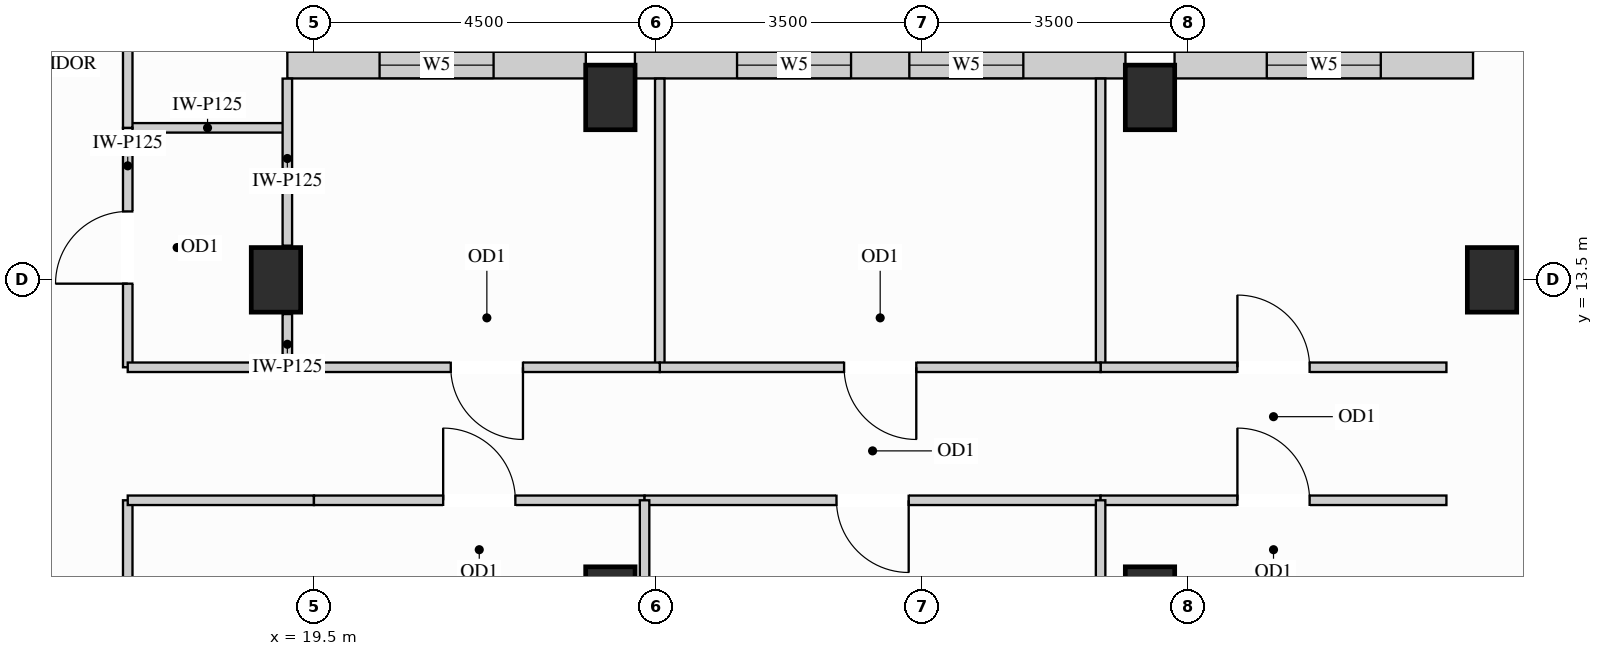
"""IFC4 building model, lengths in metres.
Left out: names, types, materials, properties, quantities, classifications, styles, units other than length and angle.
Written with IfcOpenShell. Run it as: python <this file> out.ifc"""

import sys

from ifc_helpers import new_model, si_unit, direction, frame, frame_2d, origin, origin_2d, place, context, subcontext, project, spatial, rectangle, extrude, source, transform, mapped, element, fill, save


model = new_model("IFC4")
c1 = context("Model", 3, precision=1e-05, world=origin(), true_north=direction((0.0, 1.0)))
c2 = subcontext(c1, "Body", "Model", "MODEL_VIEW")
j1 = project(units=[si_unit("LENGTHUNIT", "METRE"), si_unit("PLANEANGLEUNIT", "RADIAN")], contexts=[c1])
p1 = place(None, origin())
s1 = spatial("IfcSite", under=j1, at=p1, CompositionType="ELEMENT")
p2 = place(p1, origin())
s2 = spatial("IfcBuilding", under=s1, at=p2, CompositionType="ELEMENT")
p3 = place(p2, frame((0.0, 0.0, 230.4)))
s3 = spatial("IfcBuildingStorey", under=s2, at=p3, CompositionType="ELEMENT", Elevation=230.4)
m1 = source(origin(), c2, "Body", "SweptSolid", [
    extrude(rectangle(XDim=0.65, YDim=0.85, at=origin_2d()), origin(), (0.0, 0.0, 1.0), 3.4),
])
for number, where, z_axis, x_axis in (
    (1, (19.0, 13.5, 0.0), (0.0, 0.0, 1.0), (1.0, 0.0, 0.0)),
    (2, (35.0, 13.5, 0.0), (0.0, 0.0, 1.0), (1.0, 0.0, 0.0)),
    (3, (23.4, 15.9, 0.0), (0.0, 0.0, 1.0), (1.0, 0.0, 0.0)),
    (4, (23.4, 9.3, 0.0), (0.0, 0.0, 1.0), (1.0, 0.0, 0.0)),
    (5, (30.5, 15.9, 0.0), (0.0, 0.0, 1.0), (1.0, 0.0, 0.0)),
    (6, (30.5, 9.3, 0.0), (0.0, 0.0, 1.0), (1.0, 0.0, 0.0)),
):
    element("IfcColumn", number, at=place(p3, frame(where, z_axis=z_axis, x_axis=x_axis)), inside=s3, PredefinedType="COLUMN", context=c2, shape_type="MappedRepresentation", body=[
        mapped(m1, transform((0.0, 0.0, 0.0), x_axis=(1.0, 0.0, 0.0), y_axis=(0.0, 1.0, 0.0), z_axis=(0.0, 0.0, 1.0))),
    ])
m2 = source(origin(), c2, "Body", "SweptSolid", [
    extrude(rectangle(XDim=1.079, YDim=0.35, at=frame_2d((0.54, 0.0))), origin(), (0.0, 0.0, 1.0), 2.619),
])
p4 = place(p3, frame((19.325, 16.498, 0.0), z_axis=(0.0, 0.0, 1.0), x_axis=(0.0, 1.0, 0.0)))
e7 = element("IfcWall", 7, at=p4, inside=s3, PredefinedType="SOLIDWALL", context=c2, shape_type="MappedRepresentation", body=[
    mapped(m2, transform((0.0, 0.0, 0.0), x_axis=(1.0, 0.0, 0.0), y_axis=(0.0, 1.0, 0.0), z_axis=(0.0, 0.0, 1.0))),
])
m3 = source(origin(), c2, "Body", "SweptSolid", [
    extrude(rectangle(XDim=0.479, YDim=0.35, at=frame_2d((0.24, 0.0))), origin(), (0.0, 0.0, 1.0), 3.385),
])
p5 = place(p3, frame((34.575, 16.977, 0.0), z_axis=(0.0, 0.0, 1.0), x_axis=(0.0, -1.0, 0.0)))
e8 = element("IfcWall", 8, at=p5, inside=s3, PredefinedType="SOLIDWALL", context=c2, shape_type="MappedRepresentation", body=[
    mapped(m3, transform((0.0, 0.0, 0.0), x_axis=(1.0, 0.0, 0.0), y_axis=(0.0, 1.0, 0.0), z_axis=(0.0, 0.0, 1.0))),
])
p6 = place(p3, frame((34.75, 16.325, 0.0), z_axis=(0.0, 0.0, 1.0), x_axis=(-1.0, 0.0, 0.0)))
e9 = element("IfcWall", 9, at=p6, inside=s3, PredefinedType="SOLIDWALL", context=c2, shape_type="SweptSolid", body=[
    extrude(rectangle(XDim=3.927, YDim=0.35, at=frame_2d((1.963, 0.0))), origin(), (0.0, 0.0, 1.0), 3.385),
])
p7 = place(p6, frame((1.213, 0.0, 0.78)))
e10 = element("IfcOpeningElement", 10, at=p7, cuts=e9, PredefinedType="OPENING", context=c2, shape_type="SweptSolid", body=[
    extrude(rectangle(XDim=1.5, YDim=2.0, at=frame_2d((0.75, 1.0))), frame((0.0, 0.185, 0.0), z_axis=(0.0, -1.0, 0.0), x_axis=(1.0, 0.0, 0.0)), (0.0, 0.0, 1.0), 0.37),
])
p8 = place(p3, frame((30.177, 16.325, 0.0), z_axis=(0.0, 0.0, 1.0), x_axis=(-1.0, 0.0, 0.0)))
e11 = element("IfcWall", 11, at=p8, inside=s3, PredefinedType="SOLIDWALL", context=c2, shape_type="SweptSolid", body=[
    extrude(rectangle(XDim=6.454, YDim=0.35, at=frame_2d((3.227, 0.0))), origin(), (0.0, 0.0, 1.0), 3.385),
])
p9 = place(p8, frame((1.344, 0.0, 0.78)))
e12 = element("IfcOpeningElement", 12, at=p9, cuts=e11, PredefinedType="OPENING", context=c2, shape_type="SweptSolid", body=[
    extrude(rectangle(XDim=1.5, YDim=2.0, at=frame_2d((0.75, 1.0))), frame((0.0, 0.185, 0.0), z_axis=(0.0, -1.0, 0.0), x_axis=(1.0, 0.0, 0.0)), (0.0, 0.0, 1.0), 0.37),
])
p10 = place(p8, frame((3.61, 0.0, 0.78)))
e13 = element("IfcOpeningElement", 13, at=p10, cuts=e11, PredefinedType="OPENING", context=c2, shape_type="SweptSolid", body=[
    extrude(rectangle(XDim=1.5, YDim=2.0, at=frame_2d((0.75, 1.0))), frame((0.0, 0.185, 0.0), z_axis=(0.0, -1.0, 0.0), x_axis=(1.0, 0.0, 0.0)), (0.0, 0.0, 1.0), 0.37),
])
p11 = place(p3, frame((23.077, 16.325, 0.0), z_axis=(0.0, 0.0, 1.0), x_axis=(-1.0, 0.0, 0.0)))
e14 = element("IfcWall", 14, at=p11, inside=s3, PredefinedType="SOLIDWALL", context=c2, shape_type="SweptSolid", body=[
    extrude(rectangle(XDim=3.927, YDim=0.35, at=frame_2d((1.963, 0.0))), origin(), (0.0, 0.0, 1.0), 3.385),
])
p12 = place(p11, frame((1.213, 0.0, 0.78)))
e15 = element("IfcOpeningElement", 15, at=p12, cuts=e14, PredefinedType="OPENING", context=c2, shape_type="SweptSolid", body=[
    extrude(rectangle(XDim=1.5, YDim=2.0, at=frame_2d((0.75, 1.0))), frame((0.0, 0.185, 0.0), z_axis=(0.0, -1.0, 0.0), x_axis=(1.0, 0.0, 0.0)), (0.0, 0.0, 1.0), 0.37),
])
m4 = source(origin(), c2, "Body", "SweptSolid", [
    extrude(rectangle(XDim=2.1, YDim=0.125, at=frame_2d((1.05, 0.0))), origin(), (0.0, 0.0, 1.0), 3.385),
])
p13 = place(p3, frame((17.05, 15.5, 0.0), z_axis=(0.0, 0.0, 1.0), x_axis=(1.0, 0.0, 0.0)))
e16 = element("IfcWall", 16, at=p13, inside=s3, PredefinedType="PARTITIONING", context=c2, shape_type="MappedRepresentation", body=[
    mapped(m4, transform((0.0, 0.0, 0.0), x_axis=(1.0, 0.0, 0.0), y_axis=(0.0, 1.0, 0.0), z_axis=(0.0, 0.0, 1.0))),
])
m5 = source(origin(), c2, "Body", "SweptSolid", [
    extrude(rectangle(XDim=0.7, YDim=0.125, at=frame_2d((0.35, 0.0))), origin(), (0.0, 0.0, 1.0), 2.773),
])
p14 = place(p3, frame((19.15, 12.35, 0.0), z_axis=(0.0, 0.0, 1.0), x_axis=(0.0, 1.0, 0.0)))
e17 = element("IfcWall", 17, at=p14, inside=s3, PredefinedType="PARTITIONING", context=c2, shape_type="MappedRepresentation", body=[
    mapped(m5, transform((0.0, 0.0, 0.0), x_axis=(1.0, 0.0, 0.0), y_axis=(0.0, 1.0, 0.0), z_axis=(0.0, 0.0, 1.0))),
])
m6 = source(origin(), c2, "Body", "SweptSolid", [
    extrude(rectangle(XDim=2.198, YDim=0.125, at=frame_2d((1.099, 0.0))), origin(), (0.0, 0.0, 1.0), 2.619),
])
p15 = place(p3, frame((19.15, 13.95, 0.0), z_axis=(0.0, 0.0, 1.0), x_axis=(0.0, 1.0, 0.0)))
e18 = element("IfcWall", 18, at=p15, inside=s3, PredefinedType="PARTITIONING", context=c2, shape_type="MappedRepresentation", body=[
    mapped(m6, transform((0.0, 0.0, 0.0), x_axis=(1.0, 0.0, 0.0), y_axis=(0.0, 1.0, 0.0), z_axis=(0.0, 0.0, 1.0))),
])
p16 = place(p3, frame((17.05, 12.35, 0.0), z_axis=(0.0, 0.0, 1.0), x_axis=(0.0, 1.0, 0.0)))
e19 = element("IfcWall", 19, at=p16, inside=s3, PredefinedType="PARTITIONING", context=c2, shape_type="SweptSolid", body=[
    extrude(rectangle(XDim=3.15, YDim=0.125, at=frame_2d((1.575, 0.0))), origin(), (0.0, 0.0, 1.0), 3.385),
])
p17 = place(p16, frame((1.1, 0.0, 0.0)))
e20 = element("IfcOpeningElement", 20, at=p17, cuts=e19, PredefinedType="OPENING", context=c2, shape_type="SweptSolid", body=[
    extrude(rectangle(XDim=0.95, YDim=2.15, at=frame_2d((0.475, 1.075))), frame((0.0, 0.073, 0.0), z_axis=(0.0, -1.0, 0.0), x_axis=(1.0, 0.0, 0.0)), (0.0, 0.0, 1.0), 0.145),
])
p18 = place(p3, frame((17.05, 15.5, 0.0), z_axis=(0.0, 0.0, 1.0), x_axis=(0.0, 1.0, 0.0)))
e21 = element("IfcWall", 21, at=p18, inside=s3, PredefinedType="PARTITIONING", context=c2, shape_type="SweptSolid", body=[
    extrude(rectangle(XDim=7.85, YDim=0.125, at=frame_2d((3.925, 0.0))), origin(), (0.0, 0.0, 1.0), 3.385),
])
p19 = place(p18, frame((3.45, 0.0, 0.0)))
e22 = element("IfcOpeningElement", 22, at=p19, cuts=e21, PredefinedType="OPENING", context=c2, shape_type="SweptSolid", body=[
    extrude(rectangle(XDim=0.95, YDim=2.15, at=frame_2d((0.475, 1.075))), frame((0.0, 0.073, 0.0), z_axis=(0.0, -1.0, 0.0), x_axis=(1.0, 0.0, 0.0)), (0.0, 0.0, 1.0), 0.145),
])
p20 = place(p3, frame((17.05, 4.65, 0.0), z_axis=(0.0, 0.0, 1.0), x_axis=(0.0, 1.0, 0.0)))
e23 = element("IfcWall", 23, at=p20, inside=s3, PredefinedType="PARTITIONING", context=c2, shape_type="SweptSolid", body=[
    extrude(rectangle(XDim=5.95, YDim=0.125, at=frame_2d((2.975, 0.0))), origin(), (0.0, 0.0, 1.0), 3.385),
])
p21 = place(p20, frame((2.5, 0.0, 0.0)))
e24 = element("IfcOpeningElement", 24, at=p21, cuts=e23, PredefinedType="OPENING", context=c2, shape_type="SweptSolid", body=[
    extrude(rectangle(XDim=0.95, YDim=2.15, at=frame_2d((0.475, 1.075))), frame((0.0, 0.073, 0.0), z_axis=(0.0, -1.0, 0.0), x_axis=(1.0, 0.0, 0.0)), (0.0, 0.0, 1.0), 0.145),
])
m7 = source(origin(), c2, "Body", "SweptSolid", [
    extrude(rectangle(XDim=3.798, YDim=0.125, at=frame_2d((1.899, 0.0))), origin(), (0.0, 0.0, 1.0), 3.385),
])
for number, where, z_axis, x_axis in (
    (25, (24.05, 12.35, 0.0), (0.0, 0.0, 1.0), (0.0, 1.0, 0.0)),
    (26, (29.85, 12.35, 0.0), (0.0, 0.0, 1.0), (0.0, 1.0, 0.0)),
):
    element("IfcWall", number, at=place(p3, frame(where, z_axis=z_axis, x_axis=x_axis)), inside=s3, PredefinedType="PARTITIONING", context=c2, shape_type="MappedRepresentation", body=[
        mapped(m7, transform((0.0, 0.0, 0.0), x_axis=(1.0, 0.0, 0.0), y_axis=(0.0, 1.0, 0.0), z_axis=(0.0, 0.0, 1.0))),
    ])
p22 = place(p3, frame((29.85, 12.35, 0.0), z_axis=(0.0, 0.0, 1.0), x_axis=(1.0, 0.0, 0.0)))
e27 = element("IfcWall", 27, at=p22, inside=s3, PredefinedType="PARTITIONING", context=c2, shape_type="SweptSolid", body=[
    extrude(rectangle(XDim=4.55, YDim=0.125, at=frame_2d((2.275, 0.0))), origin(), (0.0, 0.0, 1.0), 3.385),
])
p23 = place(p22, frame((1.8, 0.0, 0.0)))
e28 = element("IfcOpeningElement", 28, at=p23, cuts=e27, PredefinedType="OPENING", context=c2, shape_type="SweptSolid", body=[
    extrude(rectangle(XDim=0.95, YDim=2.15, at=frame_2d((0.475, 1.075))), frame((0.0, 0.073, 0.0), z_axis=(0.0, -1.0, 0.0), x_axis=(1.0, 0.0, 0.0)), (0.0, 0.0, 1.0), 0.145),
])
p24 = place(p3, frame((24.05, 12.35, 0.0), z_axis=(0.0, 0.0, 1.0), x_axis=(1.0, 0.0, 0.0)))
e29 = element("IfcWall", 29, at=p24, inside=s3, PredefinedType="PARTITIONING", context=c2, shape_type="SweptSolid", body=[
    extrude(rectangle(XDim=5.8, YDim=0.125, at=frame_2d((2.9, 0.0))), origin(), (0.0, 0.0, 1.0), 3.385),
])
p25 = place(p24, frame((2.425, 0.0, 0.0)))
e30 = element("IfcOpeningElement", 30, at=p25, cuts=e29, PredefinedType="OPENING", context=c2, shape_type="SweptSolid", body=[
    extrude(rectangle(XDim=0.95, YDim=2.15, at=frame_2d((0.475, 1.075))), frame((0.0, 0.073, 0.0), z_axis=(0.0, -1.0, 0.0), x_axis=(1.0, 0.0, 0.0)), (0.0, 0.0, 1.0), 0.145),
])
m8 = source(origin(), c2, "Body", "SweptSolid", [
    extrude(rectangle(XDim=2.45, YDim=0.125, at=frame_2d((1.225, 0.0))), origin(), (0.0, 0.0, 1.0), 3.385),
])
p26 = place(p3, frame((17.05, 12.35, 0.0), z_axis=(0.0, 0.0, 1.0), x_axis=(1.0, 0.0, 0.0)))
e31 = element("IfcWall", 31, at=p26, inside=s3, PredefinedType="PARTITIONING", context=c2, shape_type="MappedRepresentation", body=[
    mapped(m8, transform((0.0, 0.0, 0.0), x_axis=(1.0, 0.0, 0.0), y_axis=(0.0, 1.0, 0.0), z_axis=(0.0, 0.0, 1.0))),
])
p27 = place(p3, frame((19.5, 12.35, 0.0), z_axis=(0.0, 0.0, 1.0), x_axis=(1.0, 0.0, 0.0)))
e32 = element("IfcWall", 32, at=p27, inside=s3, PredefinedType="PARTITIONING", context=c2, shape_type="SweptSolid", body=[
    extrude(rectangle(XDim=4.55, YDim=0.125, at=frame_2d((2.275, 0.0))), origin(), (0.0, 0.0, 1.0), 3.385),
])
p28 = place(p27, frame((1.8, 0.0, 0.0)))
e33 = element("IfcOpeningElement", 33, at=p28, cuts=e32, PredefinedType="OPENING", context=c2, shape_type="SweptSolid", body=[
    extrude(rectangle(XDim=0.95, YDim=2.15, at=frame_2d((0.475, 1.075))), frame((0.0, 0.073, 0.0), z_axis=(0.0, -1.0, 0.0), x_axis=(1.0, 0.0, 0.0)), (0.0, 0.0, 1.0), 0.145),
])
p29 = place(p3, frame((17.05, 10.6, 0.0), z_axis=(0.0, 0.0, 1.0), x_axis=(1.0, 0.0, 0.0)))
e34 = element("IfcWall", 34, at=p29, inside=s3, PredefinedType="PARTITIONING", context=c2, shape_type="MappedRepresentation", body=[
    mapped(m8, transform((0.0, 0.0, 0.0), x_axis=(1.0, 0.0, 0.0), y_axis=(0.0, 1.0, 0.0), z_axis=(0.0, 0.0, 1.0))),
])
p30 = place(p3, frame((19.5, 10.6, 0.0), z_axis=(0.0, 0.0, 1.0), x_axis=(1.0, 0.0, 0.0)))
e35 = element("IfcWall", 35, at=p30, inside=s3, PredefinedType="PARTITIONING", context=c2, shape_type="SweptSolid", body=[
    extrude(rectangle(XDim=4.35, YDim=0.125, at=frame_2d((2.175, 0.0))), origin(), (0.0, 0.0, 1.0), 3.385),
])
p31 = place(p30, frame((1.7, 0.0, 0.0)))
e36 = element("IfcOpeningElement", 36, at=p31, cuts=e35, PredefinedType="OPENING", context=c2, shape_type="SweptSolid", body=[
    extrude(rectangle(XDim=0.95, YDim=2.15, at=frame_2d((0.475, 1.075))), frame((0.0, 0.073, 0.0), z_axis=(0.0, -1.0, 0.0), x_axis=(1.0, 0.0, 0.0)), (0.0, 0.0, 1.0), 0.145),
])
p32 = place(p3, frame((23.85, 10.6, 0.0), z_axis=(0.0, 0.0, 1.0), x_axis=(1.0, 0.0, 0.0)))
e37 = element("IfcWall", 37, at=p32, inside=s3, PredefinedType="PARTITIONING", context=c2, shape_type="SweptSolid", body=[
    extrude(rectangle(XDim=6.0, YDim=0.125, at=frame_2d((3.0, 0.0))), origin(), (0.0, 0.0, 1.0), 3.385),
])
p33 = place(p32, frame((2.525, 0.0, 0.0)))
e38 = element("IfcOpeningElement", 38, at=p33, cuts=e37, PredefinedType="OPENING", context=c2, shape_type="SweptSolid", body=[
    extrude(rectangle(XDim=0.95, YDim=2.15, at=frame_2d((0.475, 1.075))), frame((0.0, 0.073, 0.0), z_axis=(0.0, -1.0, 0.0), x_axis=(1.0, 0.0, 0.0)), (0.0, 0.0, 1.0), 0.145),
])
p34 = place(p3, frame((29.85, 10.6, 0.0), z_axis=(0.0, 0.0, 1.0), x_axis=(1.0, 0.0, 0.0)))
e39 = element("IfcWall", 39, at=p34, inside=s3, PredefinedType="PARTITIONING", context=c2, shape_type="SweptSolid", body=[
    extrude(rectangle(XDim=4.55, YDim=0.125, at=frame_2d((2.275, 0.0))), origin(), (0.0, 0.0, 1.0), 3.385),
])
p35 = place(p34, frame((1.8, 0.0, 0.0)))
e40 = element("IfcOpeningElement", 40, at=p35, cuts=e39, PredefinedType="OPENING", context=c2, shape_type="SweptSolid", body=[
    extrude(rectangle(XDim=0.95, YDim=2.15, at=frame_2d((0.475, 1.075))), frame((0.0, 0.073, 0.0), z_axis=(0.0, -1.0, 0.0), x_axis=(1.0, 0.0, 0.0)), (0.0, 0.0, 1.0), 0.145),
])
m9 = source(origin(), c2, "Body", "SweptSolid", [
    extrude(rectangle(XDim=1.748, YDim=0.125, at=frame_2d((0.874, 0.0))), origin(), (0.0, 0.0, 1.0), 3.385),
])
for number, where, z_axis, x_axis in (
    (41, (23.85, 8.852, 0.0), (0.0, 0.0, 1.0), (0.0, 1.0, 0.0)),
    (42, (29.85, 8.852, 0.0), (0.0, 0.0, 1.0), (0.0, 1.0, 0.0)),
):
    element("IfcWall", number, at=place(p3, frame(where, z_axis=z_axis, x_axis=x_axis)), inside=s3, PredefinedType="PARTITIONING", context=c2, shape_type="MappedRepresentation", body=[
        mapped(m9, transform((0.0, 0.0, 0.0), x_axis=(1.0, 0.0, 0.0), y_axis=(0.0, 1.0, 0.0), z_axis=(0.0, 0.0, 1.0))),
    ])
m10 = source(origin(), c2, "Body", "SweptSolid", [
    extrude(rectangle(XDim=0.95, YDim=2.15, at=frame_2d((0.475, 1.075))), frame((0.0, 0.025, 0.0), z_axis=(0.0, -1.0, 0.0), x_axis=(1.0, 0.0, 0.0)), (0.0, 0.0, 1.0), 0.05),
])
p36 = place(p17, origin())
e43 = element("IfcDoor", 43, at=p36, inside=s3, OperationType="SINGLE_SWING_LEFT", PredefinedType="DOOR", context=c2, shape_type="MappedRepresentation", body=[
    mapped(m10, transform((0.0, 0.0, 0.0), x_axis=(1.0, 0.0, 0.0), y_axis=(0.0, 1.0, 0.0), z_axis=(0.0, 0.0, 1.0))),
])
fill(e20, e43)
p37 = place(p25, origin())
e44 = element("IfcDoor", 44, at=p37, inside=s3, OperationType="SINGLE_SWING_RIGHT", PredefinedType="DOOR", context=c2, shape_type="MappedRepresentation", body=[
    mapped(m10, transform((0.0, 0.0, 0.0), x_axis=(1.0, 0.0, 0.0), y_axis=(0.0, 1.0, 0.0), z_axis=(0.0, 0.0, 1.0))),
])
fill(e30, e44)
p38 = place(p28, origin())
e45 = element("IfcDoor", 45, at=p38, inside=s3, OperationType="SINGLE_SWING_RIGHT", PredefinedType="DOOR", context=c2, shape_type="MappedRepresentation", body=[
    mapped(m10, transform((0.0, 0.0, 0.0), x_axis=(1.0, 0.0, 0.0), y_axis=(0.0, 1.0, 0.0), z_axis=(0.0, 0.0, 1.0))),
])
fill(e33, e45)
p39 = place(p23, origin())
e46 = element("IfcDoor", 46, at=p39, inside=s3, OperationType="SINGLE_SWING_LEFT", PredefinedType="DOOR", context=c2, shape_type="MappedRepresentation", body=[
    mapped(m10, transform((0.0, 0.0, 0.0), x_axis=(1.0, 0.0, 0.0), y_axis=(0.0, 1.0, 0.0), z_axis=(0.0, 0.0, 1.0))),
])
fill(e28, e46)
p40 = place(p31, origin())
e47 = element("IfcDoor", 47, at=p40, inside=s3, OperationType="SINGLE_SWING_LEFT", PredefinedType="DOOR", context=c2, shape_type="MappedRepresentation", body=[
    mapped(m10, transform((0.0, 0.0, 0.0), x_axis=(1.0, 0.0, 0.0), y_axis=(0.0, 1.0, 0.0), z_axis=(0.0, 0.0, 1.0))),
])
fill(e36, e47)
p41 = place(p33, origin())
e48 = element("IfcDoor", 48, at=p41, inside=s3, OperationType="SINGLE_SWING_RIGHT", PredefinedType="DOOR", context=c2, shape_type="MappedRepresentation", body=[
    mapped(m10, transform((0.0, 0.0, 0.0), x_axis=(1.0, 0.0, 0.0), y_axis=(0.0, 1.0, 0.0), z_axis=(0.0, 0.0, 1.0))),
])
fill(e38, e48)
p42 = place(p35, origin())
e49 = element("IfcDoor", 49, at=p42, inside=s3, OperationType="SINGLE_SWING_LEFT", PredefinedType="DOOR", context=c2, shape_type="MappedRepresentation", body=[
    mapped(m10, transform((0.0, 0.0, 0.0), x_axis=(1.0, 0.0, 0.0), y_axis=(0.0, 1.0, 0.0), z_axis=(0.0, 0.0, 1.0))),
])
fill(e40, e49)
m11 = source(origin(), c2, "Body", "SweptSolid", [
    extrude(rectangle(XDim=1.5, YDim=2.0, at=frame_2d((0.75, 1.0))), frame((0.0, 0.03, 0.0), z_axis=(0.0, -1.0, 0.0), x_axis=(1.0, 0.0, 0.0)), (0.0, 0.0, 1.0), 0.06),
])
p43 = place(p7, origin())
e50 = element("IfcWindow", 50, at=p43, inside=s3, PartitioningType="SINGLE_PANEL", PredefinedType="WINDOW", context=c2, shape_type="MappedRepresentation", body=[
    mapped(m11, transform((0.0, 0.0, 0.0), x_axis=(1.0, 0.0, 0.0), y_axis=(0.0, 1.0, 0.0), z_axis=(0.0, 0.0, 1.0))),
])
fill(e10, e50)
p44 = place(p9, origin())
e51 = element("IfcWindow", 51, at=p44, inside=s3, PartitioningType="SINGLE_PANEL", PredefinedType="WINDOW", context=c2, shape_type="MappedRepresentation", body=[
    mapped(m11, transform((0.0, 0.0, 0.0), x_axis=(1.0, 0.0, 0.0), y_axis=(0.0, 1.0, 0.0), z_axis=(0.0, 0.0, 1.0))),
])
fill(e12, e51)
p45 = place(p10, origin())
e52 = element("IfcWindow", 52, at=p45, inside=s3, PartitioningType="SINGLE_PANEL", PredefinedType="WINDOW", context=c2, shape_type="MappedRepresentation", body=[
    mapped(m11, transform((0.0, 0.0, 0.0), x_axis=(1.0, 0.0, 0.0), y_axis=(0.0, 1.0, 0.0), z_axis=(0.0, 0.0, 1.0))),
])
fill(e13, e52)
p46 = place(p12, origin())
e53 = element("IfcWindow", 53, at=p46, inside=s3, PartitioningType="SINGLE_PANEL", PredefinedType="WINDOW", context=c2, shape_type="MappedRepresentation", body=[
    mapped(m11, transform((0.0, 0.0, 0.0), x_axis=(1.0, 0.0, 0.0), y_axis=(0.0, 1.0, 0.0), z_axis=(0.0, 0.0, 1.0))),
])
fill(e15, e53)
save(model, sys.argv[1])
